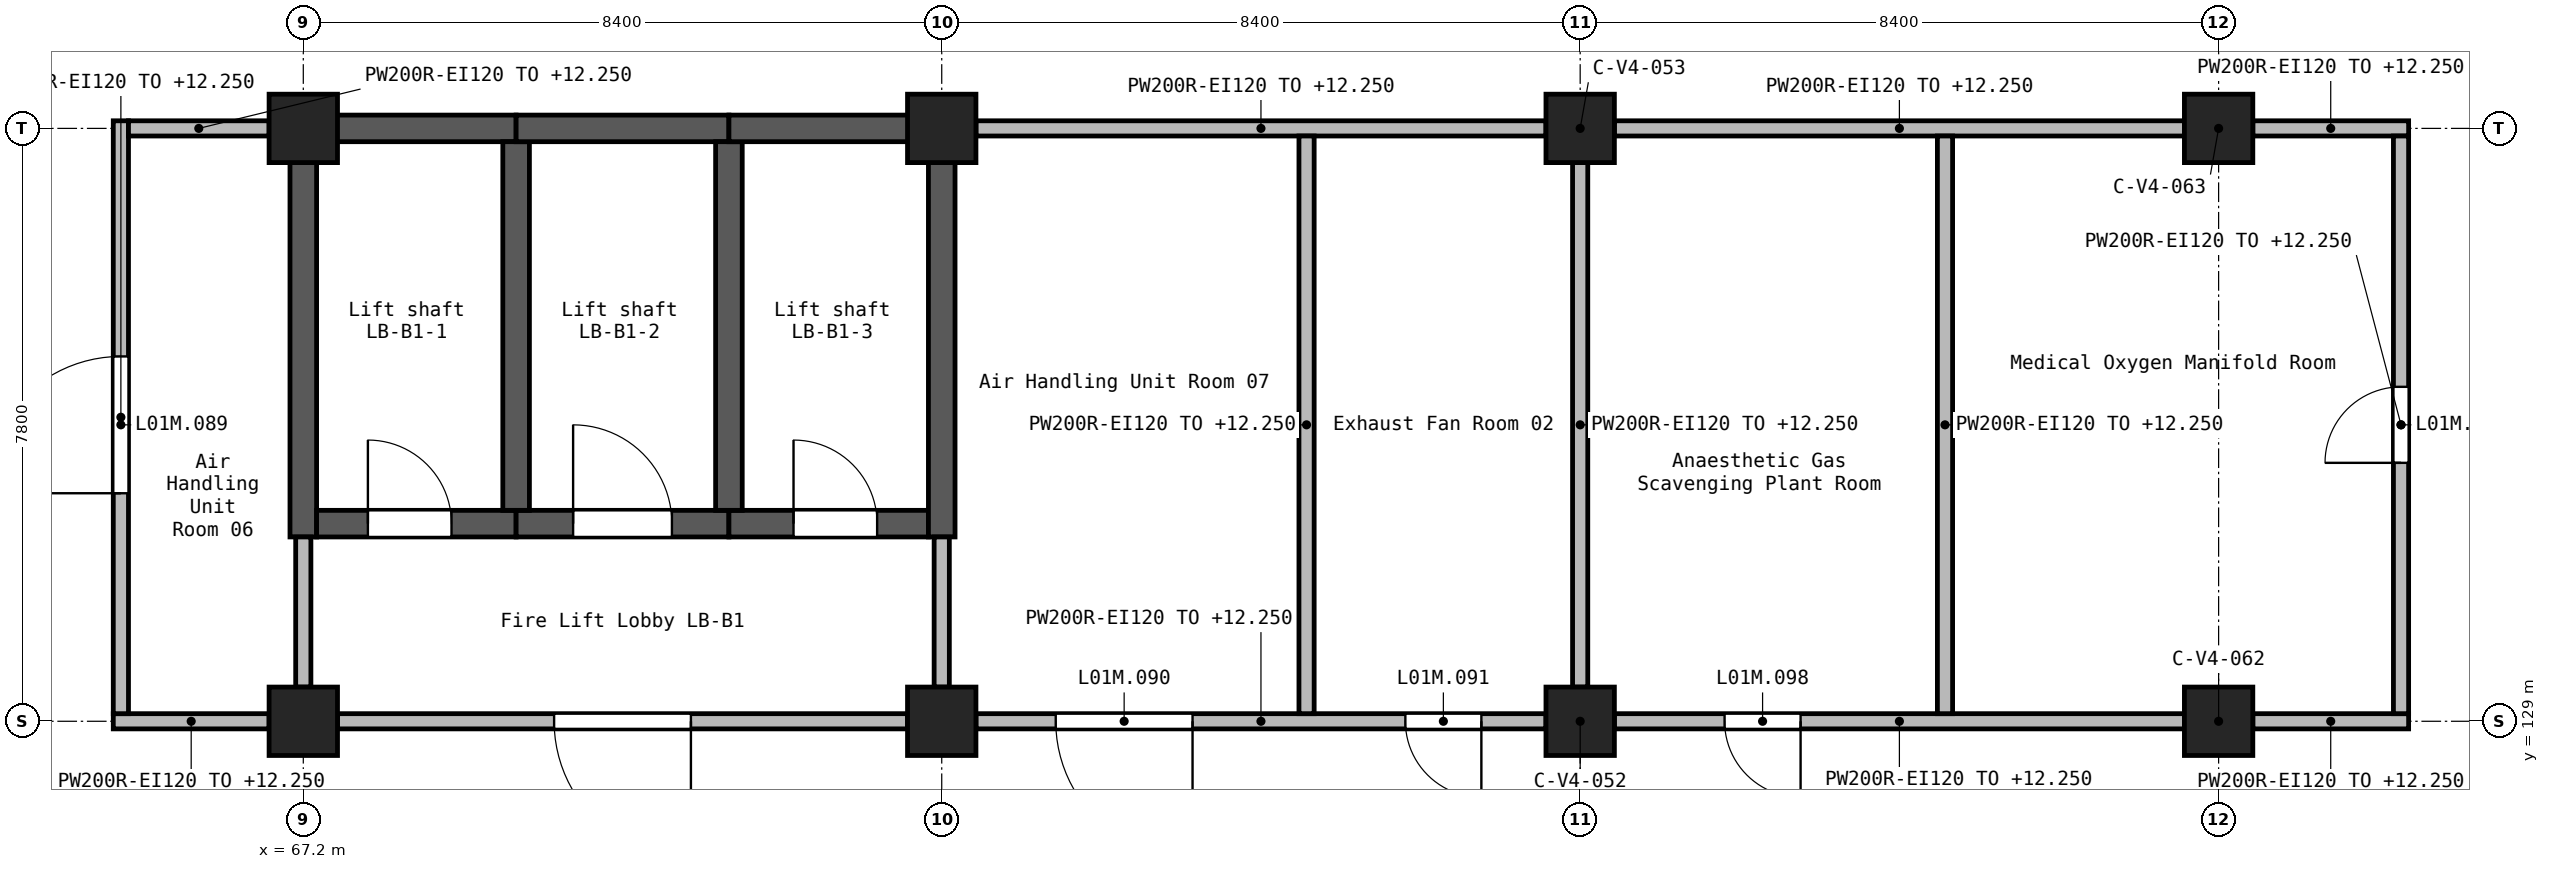
"""IFC4 building model, lengths in metres.
Left out: names, types, materials, properties, quantities, classifications, styles, units other than length and angle.
Written with IfcOpenShell. Run it as: python <this file> out.ifc"""

import sys

from ifc_helpers import new_model, si_unit, direction, frame, frame_2d, origin, origin_2d, place, context, subcontext, project, spatial, rectangle, extrude, element, fill, save


model = new_model("IFC4")
c1 = context("Model", 3, precision=1e-05, world=origin(), true_north=direction((0.0, 1.0)))
c2 = subcontext(c1, "Body", "Model", "MODEL_VIEW")
j1 = project(units=[si_unit("LENGTHUNIT", "METRE"), si_unit("PLANEANGLEUNIT", "RADIAN")], contexts=[c1])
p1 = place(None, origin())
s1 = spatial("IfcSite", under=j1, at=p1, CompositionType="ELEMENT")
p2 = place(p1, origin())
s2 = spatial("IfcBuilding", under=s1, at=p2, CompositionType="ELEMENT")
p3 = place(p2, frame((0.0, 0.0, 9.9)))
s3 = spatial("IfcBuildingStorey", under=s2, at=p3, CompositionType="ELEMENT", Elevation=9.9)
for number, where, z_axis, x_axis in (
    (1, (67.2, 129.0, 0.0), (0.0, 0.0, 1.0), (1.0, 0.0, 0.0)),
    (2, (67.2, 136.8, 0.0), (0.0, 0.0, 1.0), (1.0, 0.0, 0.0)),
    (3, (75.6, 129.0, 0.0), (0.0, 0.0, 1.0), (1.0, 0.0, 0.0)),
    (4, (75.6, 136.8, 0.0), (0.0, 0.0, 1.0), (1.0, 0.0, 0.0)),
    (5, (84.0, 129.0, 0.0), (0.0, 0.0, 1.0), (1.0, 0.0, 0.0)),
    (6, (84.0, 136.8, 0.0), (0.0, 0.0, 1.0), (1.0, 0.0, 0.0)),
    (7, (92.4, 129.0, 0.0), (0.0, 0.0, 1.0), (1.0, 0.0, 0.0)),
    (8, (92.4, 136.8, 0.0), (0.0, 0.0, 1.0), (1.0, 0.0, 0.0)),
):
    element("IfcColumn", number, at=place(p3, frame(where, z_axis=z_axis, x_axis=x_axis)), inside=s3, PredefinedType="COLUMN", context=c2, shape_type="SweptSolid", body=[
        extrude(rectangle(XDim=0.9, YDim=0.9, at=origin_2d()), origin(), (0.0, 0.0, 1.0), 2.7),
    ])
p4 = place(p3, frame((67.025, 136.8, 0.0), z_axis=(0.0, 0.0, 1.0), x_axis=(1.0, 0.0, 0.0)))
e9 = element("IfcWall", 9, at=p4, inside=s3, PredefinedType="SHEAR", context=c2, shape_type="SweptSolid", body=[
    extrude(rectangle(XDim=2.975, YDim=0.35, at=frame_2d((1.488, 0.0))), origin(), (0.0, 0.0, 1.0), 2.7),
])
p5 = place(p3, frame((67.2, 131.425, 0.0), z_axis=(0.0, 0.0, 1.0), x_axis=(0.0, 1.0, 0.0)))
e10 = element("IfcWall", 10, at=p5, inside=s3, PredefinedType="SHEAR", context=c2, shape_type="SweptSolid", body=[
    extrude(rectangle(XDim=5.2, YDim=0.35, at=frame_2d((2.6, 0.0))), origin(), (0.0, 0.0, 1.0), 2.7),
])
p6 = place(p3, frame((67.375, 131.6, 0.0), z_axis=(0.0, 0.0, 1.0), x_axis=(1.0, 0.0, 0.0)))
e11 = element("IfcWall", 11, at=p6, inside=s3, PredefinedType="SHEAR", context=c2, shape_type="SweptSolid", body=[
    extrude(rectangle(XDim=2.625, YDim=0.35, at=frame_2d((1.312, 0.0))), origin(), (0.0, 0.0, 1.0), 2.7),
])
p7 = place(p6, frame((0.675, 0.0, 0.0)))
e12 = element("IfcOpeningElement", 12, at=p7, cuts=e11, PredefinedType="OPENING", context=c2, shape_type="SweptSolid", body=[
    extrude(rectangle(XDim=1.1, YDim=2.1, at=frame_2d((0.55, 1.05))), frame((0.0, 0.185, 0.0), z_axis=(0.0, -1.0, 0.0), x_axis=(1.0, 0.0, 0.0)), (0.0, 0.0, 1.0), 0.37),
])
p8 = place(p3, frame((70.0, 131.6, 0.0), z_axis=(0.0, 0.0, 1.0), x_axis=(1.0, 0.0, 0.0)))
e13 = element("IfcWall", 13, at=p8, inside=s3, PredefinedType="SHEAR", context=c2, shape_type="SweptSolid", body=[
    extrude(rectangle(XDim=2.8, YDim=0.35, at=frame_2d((1.4, 0.0))), origin(), (0.0, 0.0, 1.0), 2.7),
])
p9 = place(p8, frame((0.75, 0.0, 0.0)))
e14 = element("IfcOpeningElement", 14, at=p9, cuts=e13, PredefinedType="OPENING", context=c2, shape_type="SweptSolid", body=[
    extrude(rectangle(XDim=1.3, YDim=2.1, at=frame_2d((0.65, 1.05))), frame((0.0, 0.185, 0.0), z_axis=(0.0, -1.0, 0.0), x_axis=(1.0, 0.0, 0.0)), (0.0, 0.0, 1.0), 0.37),
])
p10 = place(p3, frame((70.0, 131.775, 0.0), z_axis=(0.0, 0.0, 1.0), x_axis=(0.0, 1.0, 0.0)))
e15 = element("IfcWall", 15, at=p10, inside=s3, PredefinedType="SHEAR", context=c2, shape_type="SweptSolid", body=[
    extrude(rectangle(XDim=4.85, YDim=0.35, at=frame_2d((2.425, 0.0))), origin(), (0.0, 0.0, 1.0), 2.7),
])
p11 = place(p3, frame((70.0, 136.8, 0.0), z_axis=(0.0, 0.0, 1.0), x_axis=(1.0, 0.0, 0.0)))
e16 = element("IfcWall", 16, at=p11, inside=s3, PredefinedType="SHEAR", context=c2, shape_type="SweptSolid", body=[
    extrude(rectangle(XDim=2.8, YDim=0.35, at=frame_2d((1.4, 0.0))), origin(), (0.0, 0.0, 1.0), 2.7),
])
p12 = place(p3, frame((72.8, 131.6, 0.0), z_axis=(0.0, 0.0, 1.0), x_axis=(1.0, 0.0, 0.0)))
e17 = element("IfcWall", 17, at=p12, inside=s3, PredefinedType="SHEAR", context=c2, shape_type="SweptSolid", body=[
    extrude(rectangle(XDim=2.625, YDim=0.35, at=frame_2d((1.312, 0.0))), origin(), (0.0, 0.0, 1.0), 2.7),
])
p13 = place(p12, frame((0.85, 0.0, 0.0)))
e18 = element("IfcOpeningElement", 18, at=p13, cuts=e17, PredefinedType="OPENING", context=c2, shape_type="SweptSolid", body=[
    extrude(rectangle(XDim=1.1, YDim=2.1, at=frame_2d((0.55, 1.05))), frame((0.0, 0.185, 0.0), z_axis=(0.0, -1.0, 0.0), x_axis=(1.0, 0.0, 0.0)), (0.0, 0.0, 1.0), 0.37),
])
p14 = place(p3, frame((72.8, 131.775, 0.0), z_axis=(0.0, 0.0, 1.0), x_axis=(0.0, 1.0, 0.0)))
e19 = element("IfcWall", 19, at=p14, inside=s3, PredefinedType="SHEAR", context=c2, shape_type="SweptSolid", body=[
    extrude(rectangle(XDim=4.85, YDim=0.35, at=frame_2d((2.425, 0.0))), origin(), (0.0, 0.0, 1.0), 2.7),
])
p15 = place(p3, frame((72.8, 136.8, 0.0), z_axis=(0.0, 0.0, 1.0), x_axis=(1.0, 0.0, 0.0)))
e20 = element("IfcWall", 20, at=p15, inside=s3, PredefinedType="SHEAR", context=c2, shape_type="SweptSolid", body=[
    extrude(rectangle(XDim=2.625, YDim=0.35, at=frame_2d((1.312, 0.0))), origin(), (0.0, 0.0, 1.0), 2.7),
])
p16 = place(p3, frame((75.6, 131.425, 0.0), z_axis=(0.0, 0.0, 1.0), x_axis=(0.0, 1.0, 0.0)))
e21 = element("IfcWall", 21, at=p16, inside=s3, PredefinedType="SHEAR", context=c2, shape_type="SweptSolid", body=[
    extrude(rectangle(XDim=5.55, YDim=0.35, at=frame_2d((2.775, 0.0))), origin(), (0.0, 0.0, 1.0), 2.7),
])
p17 = place(p3, frame((94.9, 129.0, 0.0), z_axis=(0.0, 0.0, 1.0), x_axis=(-1.0, 0.0, 0.0)))
e22 = element("IfcWall", 22, at=p17, inside=s3, PredefinedType="SOLIDWALL", context=c2, shape_type="SweptSolid", body=[
    extrude(rectangle(XDim=2.05, YDim=0.2, at=frame_2d((1.025, 0.0))), origin(), (0.0, 0.0, 1.0), 2.35),
])
p18 = place(p3, frame((91.95, 129.0, 0.0), z_axis=(0.0, 0.0, 1.0), x_axis=(-1.0, 0.0, 0.0)))
e23 = element("IfcWall", 23, at=p18, inside=s3, PredefinedType="SOLIDWALL", context=c2, shape_type="SweptSolid", body=[
    extrude(rectangle(XDim=7.5, YDim=0.2, at=frame_2d((3.75, 0.0))), origin(), (0.0, 0.0, 1.0), 2.35),
])
p19 = place(p18, frame((5.05, 0.0, 0.0)))
e24 = element("IfcOpeningElement", 24, at=p19, cuts=e23, PredefinedType="OPENING", context=c2, shape_type="SweptSolid", body=[
    extrude(rectangle(XDim=1.0, YDim=2.1, at=frame_2d((0.5, 1.05))), frame((0.0, 0.11, 0.0), z_axis=(0.0, -1.0, 0.0), x_axis=(1.0, 0.0, 0.0)), (0.0, 0.0, 1.0), 0.22),
])
p20 = place(p3, frame((83.55, 129.0, 0.0), z_axis=(0.0, 0.0, 1.0), x_axis=(-1.0, 0.0, 0.0)))
e25 = element("IfcWall", 25, at=p20, inside=s3, PredefinedType="SOLIDWALL", context=c2, shape_type="SweptSolid", body=[
    extrude(rectangle(XDim=7.5, YDim=0.2, at=frame_2d((3.75, 0.0))), origin(), (0.0, 0.0, 1.0), 2.35),
])
p21 = place(p20, frame((4.65, 0.0, 0.0)))
e26 = element("IfcOpeningElement", 26, at=p21, cuts=e25, PredefinedType="OPENING", context=c2, shape_type="SweptSolid", body=[
    extrude(rectangle(XDim=1.8, YDim=2.1, at=frame_2d((0.9, 1.05))), frame((0.0, 0.11, 0.0), z_axis=(0.0, -1.0, 0.0), x_axis=(1.0, 0.0, 0.0)), (0.0, 0.0, 1.0), 0.22),
])
p22 = place(p20, frame((0.85, 0.0, 0.0)))
e27 = element("IfcOpeningElement", 27, at=p22, cuts=e25, PredefinedType="OPENING", context=c2, shape_type="SweptSolid", body=[
    extrude(rectangle(XDim=1.0, YDim=2.1, at=frame_2d((0.5, 1.05))), frame((0.0, 0.11, 0.0), z_axis=(0.0, -1.0, 0.0), x_axis=(1.0, 0.0, 0.0)), (0.0, 0.0, 1.0), 0.22),
])
p23 = place(p3, frame((75.15, 129.0, 0.0), z_axis=(0.0, 0.0, 1.0), x_axis=(-1.0, 0.0, 0.0)))
e28 = element("IfcWall", 28, at=p23, inside=s3, PredefinedType="SOLIDWALL", context=c2, shape_type="SweptSolid", body=[
    extrude(rectangle(XDim=7.5, YDim=0.2, at=frame_2d((3.75, 0.0))), origin(), (0.0, 0.0, 1.0), 2.35),
])
p24 = place(p23, frame((2.85, 0.0, 0.0)))
e29 = element("IfcOpeningElement", 29, at=p24, cuts=e28, PredefinedType="OPENING", context=c2, shape_type="SweptSolid", body=[
    extrude(rectangle(XDim=1.8, YDim=2.1, at=frame_2d((0.9, 1.05))), frame((0.0, 0.11, 0.0), z_axis=(0.0, -1.0, 0.0), x_axis=(1.0, 0.0, 0.0)), (0.0, 0.0, 1.0), 0.22),
])
p25 = place(p3, frame((66.75, 129.0, 0.0), z_axis=(0.0, 0.0, 1.0), x_axis=(-1.0, 0.0, 0.0)))
e30 = element("IfcWall", 30, at=p25, inside=s3, PredefinedType="SOLIDWALL", context=c2, shape_type="SweptSolid", body=[
    extrude(rectangle(XDim=2.05, YDim=0.2, at=frame_2d((1.025, 0.0))), origin(), (0.0, 0.0, 1.0), 2.35),
])
p26 = place(p3, frame((94.9, 136.8, 0.0), z_axis=(0.0, 0.0, 1.0), x_axis=(-1.0, 0.0, 0.0)))
e31 = element("IfcWall", 31, at=p26, inside=s3, PredefinedType="SOLIDWALL", context=c2, shape_type="SweptSolid", body=[
    extrude(rectangle(XDim=2.05, YDim=0.2, at=frame_2d((1.025, 0.0))), origin(), (0.0, 0.0, 1.0), 2.35),
])
for number, where, z_axis, x_axis in (
    (32, (91.95, 136.8, 0.0), (0.0, 0.0, 1.0), (-1.0, 0.0, 0.0)),
    (33, (83.55, 136.8, 0.0), (0.0, 0.0, 1.0), (-1.0, 0.0, 0.0)),
):
    element("IfcWall", number, at=place(p3, frame(where, z_axis=z_axis, x_axis=x_axis)), inside=s3, PredefinedType="SOLIDWALL", context=c2, shape_type="SweptSolid", body=[
        extrude(rectangle(XDim=7.5, YDim=0.2, at=frame_2d((3.75, 0.0))), origin(), (0.0, 0.0, 1.0), 2.35),
    ])
for number, where, z_axis, x_axis in (
    (34, (67.2, 129.45, 0.0), (0.0, 0.0, 1.0), (0.0, 1.0, 0.0)),
    (35, (75.6, 129.45, 0.0), (0.0, 0.0, 1.0), (0.0, 1.0, 0.0)),
):
    element("IfcWall", number, at=place(p3, frame(where, z_axis=z_axis, x_axis=x_axis)), inside=s3, PredefinedType="SOLIDWALL", context=c2, shape_type="SweptSolid", body=[
        extrude(rectangle(XDim=1.975, YDim=0.2, at=frame_2d((0.988, 0.0))), origin(), (0.0, 0.0, 1.0), 2.35),
    ])
p27 = place(p3, frame((64.8, 129.1, 0.0), z_axis=(0.0, 0.0, 1.0), x_axis=(0.0, 1.0, 0.0)))
e36 = element("IfcWall", 36, at=p27, inside=s3, PredefinedType="SOLIDWALL", context=c2, shape_type="SweptSolid", body=[
    extrude(rectangle(XDim=7.8, YDim=0.2, at=frame_2d((3.9, 0.0))), origin(), (0.0, 0.0, 1.0), 2.35),
])
p28 = place(p27, frame((2.9, 0.0, 0.0)))
e37 = element("IfcOpeningElement", 37, at=p28, cuts=e36, PredefinedType="OPENING", context=c2, shape_type="SweptSolid", body=[
    extrude(rectangle(XDim=1.8, YDim=2.1, at=frame_2d((0.9, 1.05))), frame((0.0, 0.11, 0.0), z_axis=(0.0, -1.0, 0.0), x_axis=(1.0, 0.0, 0.0)), (0.0, 0.0, 1.0), 0.22),
])
p29 = place(p3, frame((80.4, 129.1, 0.0), z_axis=(0.0, 0.0, 1.0), x_axis=(0.0, 1.0, 0.0)))
e38 = element("IfcWall", 38, at=p29, inside=s3, PredefinedType="SOLIDWALL", context=c2, shape_type="SweptSolid", body=[
    extrude(rectangle(XDim=7.6, YDim=0.2, at=frame_2d((3.8, 0.0))), origin(), (0.0, 0.0, 1.0), 2.35),
])
p30 = place(p3, frame((84.0, 129.45, 0.0), z_axis=(0.0, 0.0, 1.0), x_axis=(0.0, 1.0, 0.0)))
e39 = element("IfcWall", 39, at=p30, inside=s3, PredefinedType="SOLIDWALL", context=c2, shape_type="SweptSolid", body=[
    extrude(rectangle(XDim=6.9, YDim=0.2, at=frame_2d((3.45, 0.0))), origin(), (0.0, 0.0, 1.0), 2.35),
])
p31 = place(p3, frame((88.8, 129.1, 0.0), z_axis=(0.0, 0.0, 1.0), x_axis=(0.0, 1.0, 0.0)))
e40 = element("IfcWall", 40, at=p31, inside=s3, PredefinedType="SOLIDWALL", context=c2, shape_type="SweptSolid", body=[
    extrude(rectangle(XDim=7.6, YDim=0.2, at=frame_2d((3.8, 0.0))), origin(), (0.0, 0.0, 1.0), 2.35),
])
p32 = place(p3, frame((94.8, 129.1, 0.0), z_axis=(0.0, 0.0, 1.0), x_axis=(0.0, 1.0, 0.0)))
e41 = element("IfcWall", 41, at=p32, inside=s3, PredefinedType="SOLIDWALL", context=c2, shape_type="SweptSolid", body=[
    extrude(rectangle(XDim=7.6, YDim=0.2, at=frame_2d((3.8, 0.0))), origin(), (0.0, 0.0, 1.0), 2.35),
])
p33 = place(p32, frame((3.3, 0.0, 0.0)))
e42 = element("IfcOpeningElement", 42, at=p33, cuts=e41, PredefinedType="OPENING", context=c2, shape_type="SweptSolid", body=[
    extrude(rectangle(XDim=1.0, YDim=2.1, at=frame_2d((0.5, 1.05))), frame((0.0, 0.11, 0.0), z_axis=(0.0, -1.0, 0.0), x_axis=(1.0, 0.0, 0.0)), (0.0, 0.0, 1.0), 0.22),
])
p34 = place(p3, frame((64.9, 136.8, 0.0), z_axis=(0.0, 0.0, 1.0), x_axis=(1.0, 0.0, 0.0)))
e43 = element("IfcWall", 43, at=p34, inside=s3, PredefinedType="SOLIDWALL", context=c2, shape_type="SweptSolid", body=[
    extrude(rectangle(XDim=1.85, YDim=0.2, at=frame_2d((0.925, 0.0))), origin(), (0.0, 0.0, 1.0), 2.35),
])
p35 = place(p24, frame((1.8, 0.0, 0.0), z_axis=(0.0, 0.0, 1.0), x_axis=(-1.0, 0.0, 0.0)))
e44 = element("IfcDoor", 44, at=p35, inside=s3, OperationType="DOUBLE_DOOR_SINGLE_SWING", PredefinedType="DOOR", context=c2, shape_type="SweptSolid", body=[
    extrude(rectangle(XDim=1.8, YDim=2.1, at=frame_2d((0.9, 1.05))), frame((0.0, 0.025, 0.0), z_axis=(0.0, -1.0, 0.0), x_axis=(1.0, 0.0, 0.0)), (0.0, 0.0, 1.0), 0.05),
])
fill(e29, e44)
p36 = place(p28, frame((1.8, 0.0, 0.0), z_axis=(0.0, 0.0, 1.0), x_axis=(-1.0, 0.0, 0.0)))
e45 = element("IfcDoor", 45, at=p36, inside=s3, OperationType="DOUBLE_DOOR_SINGLE_SWING", PredefinedType="DOOR", context=c2, shape_type="SweptSolid", body=[
    extrude(rectangle(XDim=1.8, YDim=2.1, at=frame_2d((0.9, 1.05))), frame((0.0, 0.025, 0.0), z_axis=(0.0, -1.0, 0.0), x_axis=(1.0, 0.0, 0.0)), (0.0, 0.0, 1.0), 0.05),
])
fill(e37, e45)
p37 = place(p21, frame((1.8, 0.0, 0.0), z_axis=(0.0, 0.0, 1.0), x_axis=(-1.0, 0.0, 0.0)))
e46 = element("IfcDoor", 46, at=p37, inside=s3, OperationType="DOUBLE_DOOR_SINGLE_SWING", PredefinedType="DOOR", context=c2, shape_type="SweptSolid", body=[
    extrude(rectangle(XDim=1.8, YDim=2.1, at=frame_2d((0.9, 1.05))), frame((0.0, 0.025, 0.0), z_axis=(0.0, -1.0, 0.0), x_axis=(1.0, 0.0, 0.0)), (0.0, 0.0, 1.0), 0.05),
])
fill(e26, e46)
p38 = place(p22, frame((1.0, 0.0, 0.0), z_axis=(0.0, 0.0, 1.0), x_axis=(-1.0, 0.0, 0.0)))
e47 = element("IfcDoor", 47, at=p38, inside=s3, OperationType="SINGLE_SWING_RIGHT", PredefinedType="DOOR", context=c2, shape_type="SweptSolid", body=[
    extrude(rectangle(XDim=1.0, YDim=2.1, at=frame_2d((0.5, 1.05))), frame((0.0, 0.025, 0.0), z_axis=(0.0, -1.0, 0.0), x_axis=(1.0, 0.0, 0.0)), (0.0, 0.0, 1.0), 0.05),
])
fill(e27, e47)
p39 = place(p19, frame((1.0, 0.0, 0.0), z_axis=(0.0, 0.0, 1.0), x_axis=(-1.0, 0.0, 0.0)))
e48 = element("IfcDoor", 48, at=p39, inside=s3, OperationType="SINGLE_SWING_LEFT", PredefinedType="DOOR", context=c2, shape_type="SweptSolid", body=[
    extrude(rectangle(XDim=1.0, YDim=2.1, at=frame_2d((0.5, 1.05))), frame((0.0, 0.025, 0.0), z_axis=(0.0, -1.0, 0.0), x_axis=(1.0, 0.0, 0.0)), (0.0, 0.0, 1.0), 0.05),
])
fill(e24, e48)
p40 = place(p33, origin())
e49 = element("IfcDoor", 49, at=p40, inside=s3, OperationType="SINGLE_SWING_LEFT", PredefinedType="DOOR", context=c2, shape_type="SweptSolid", body=[
    extrude(rectangle(XDim=1.0, YDim=2.1, at=frame_2d((0.5, 1.05))), frame((0.0, 0.025, 0.0), z_axis=(0.0, -1.0, 0.0), x_axis=(1.0, 0.0, 0.0)), (0.0, 0.0, 1.0), 0.05),
])
fill(e42, e49)
p41 = place(p7, origin())
e50 = element("IfcDoor", 50, at=p41, inside=s3, OperationType="DOUBLE_DOOR_SLIDING", PredefinedType="DOOR", context=c2, shape_type="SweptSolid", body=[
    extrude(rectangle(XDim=1.1, YDim=2.1, at=frame_2d((0.55, 1.05))), frame((0.0, 0.025, 0.0), z_axis=(0.0, -1.0, 0.0), x_axis=(1.0, 0.0, 0.0)), (0.0, 0.0, 1.0), 0.05),
])
fill(e12, e50)
p42 = place(p9, origin())
e51 = element("IfcDoor", 51, at=p42, inside=s3, OperationType="DOUBLE_DOOR_SLIDING", PredefinedType="DOOR", context=c2, shape_type="SweptSolid", body=[
    extrude(rectangle(XDim=1.3, YDim=2.1, at=frame_2d((0.65, 1.05))), frame((0.0, 0.025, 0.0), z_axis=(0.0, -1.0, 0.0), x_axis=(1.0, 0.0, 0.0)), (0.0, 0.0, 1.0), 0.05),
])
fill(e14, e51)
p43 = place(p13, origin())
e52 = element("IfcDoor", 52, at=p43, inside=s3, OperationType="DOUBLE_DOOR_SLIDING", PredefinedType="DOOR", context=c2, shape_type="SweptSolid", body=[
    extrude(rectangle(XDim=1.1, YDim=2.1, at=frame_2d((0.55, 1.05))), frame((0.0, 0.025, 0.0), z_axis=(0.0, -1.0, 0.0), x_axis=(1.0, 0.0, 0.0)), (0.0, 0.0, 1.0), 0.05),
])
fill(e18, e52)
save(model, sys.argv[1])
